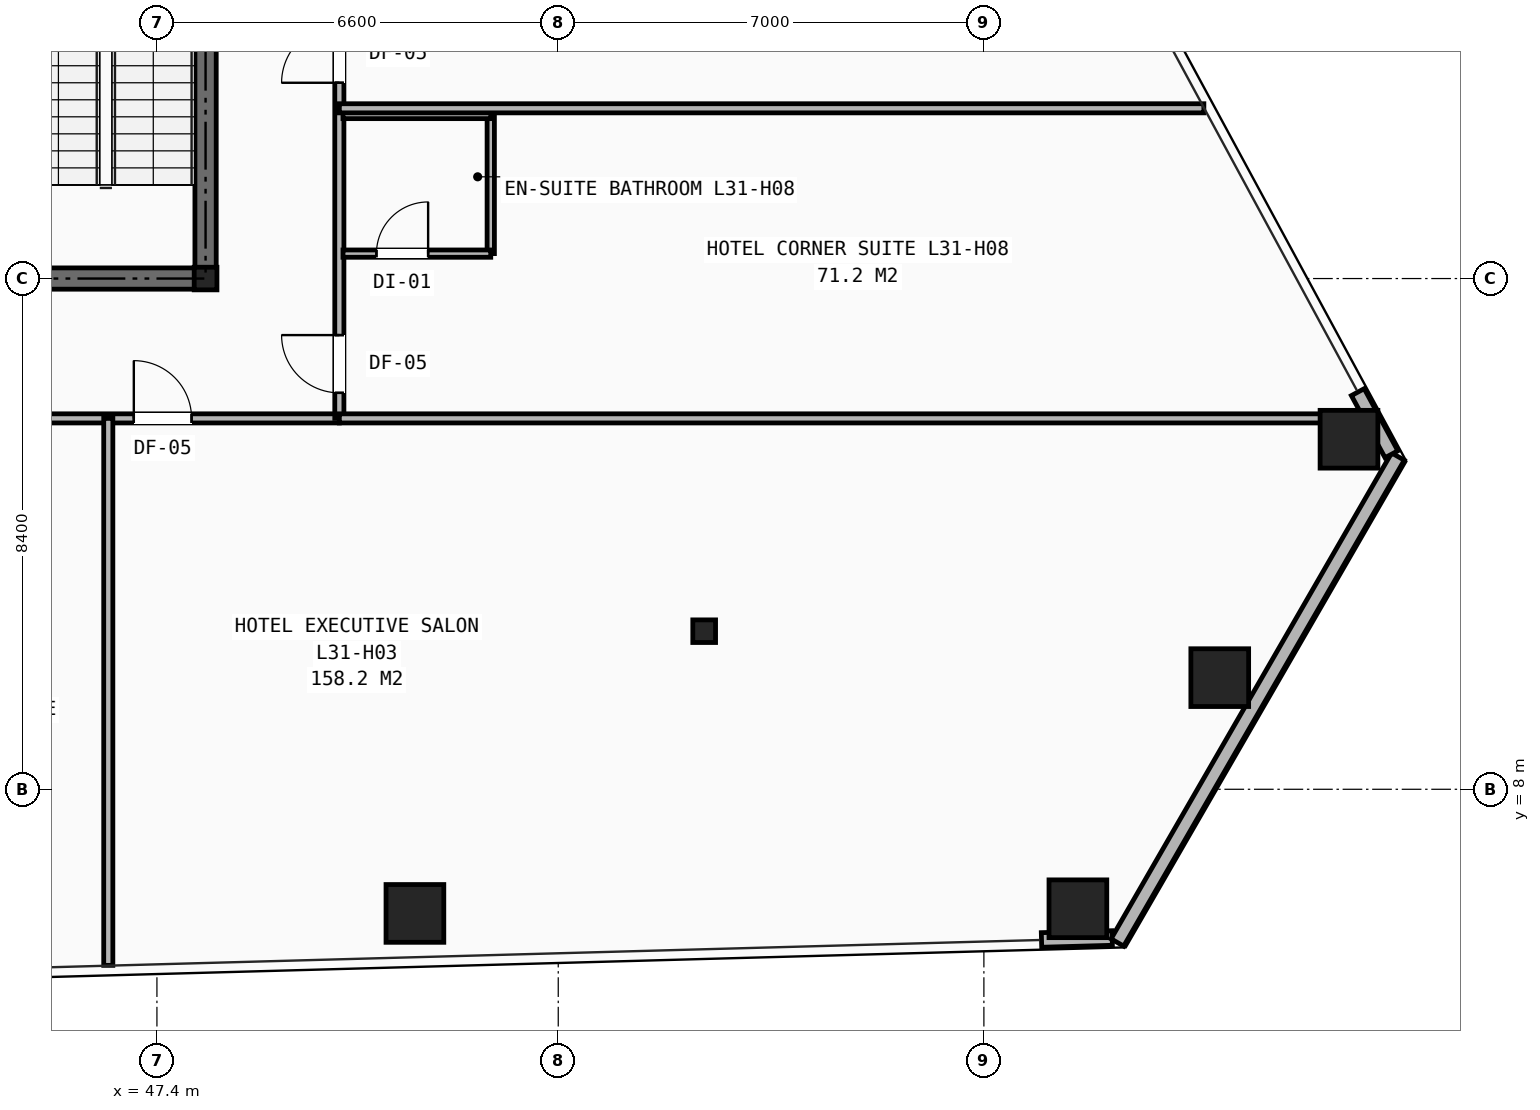
"""IFC4 building model, lengths in metres.
Left out: names, types, materials, properties, quantities, classifications, styles, units other than length and angle.
Written with IfcOpenShell. Run it as: python <this file> out.ifc"""

import sys

from ifc_helpers import new_model, si_unit, direction, frame, frame_2d, origin, origin_2d, place, context, subcontext, project, spatial, rectangle, hollow_rectangle, i_section, extrude, element, fill, save


model = new_model("IFC4")
c1 = context("Model", 3, precision=1e-05, world=origin(), true_north=direction((0.0, 1.0)))
c2 = subcontext(c1, "Body", "Model", "MODEL_VIEW")
j1 = project(units=[si_unit("LENGTHUNIT", "METRE"), si_unit("PLANEANGLEUNIT", "RADIAN")], contexts=[c1])
p1 = place(None, origin())
s1 = spatial("IfcSite", under=j1, at=p1, CompositionType="ELEMENT")
p2 = place(p1, origin())
s2 = spatial("IfcBuilding", under=s1, at=p2, CompositionType="ELEMENT")
p3 = place(p2, frame((0.0, 0.0, 108.6)))
s3 = spatial("IfcBuildingStorey", under=s2, at=p3, CompositionType="ELEMENT", Elevation=108.6)
for number, where, z_axis, x_axis in (
    (1, (48.2, 16.4, 0.0), (0.0, 0.0, 1.0), (1.0, 0.0, 0.0)),
    (2, (56.4, 10.6, 0.0), (0.0, 0.0, 1.0), (1.0, 0.0, 0.0)),
):
    element("IfcColumn", number, at=place(p3, frame(where, z_axis=z_axis, x_axis=x_axis)), inside=s3, PredefinedType="COLUMN", context=c2, shape_type="SweptSolid", body=[
        extrude(i_section(OverallWidth=0.374, OverallDepth=0.372, WebThickness=0.016, FlangeThickness=0.026, at=origin_2d()), origin(), (0.0, 0.0, 1.0), 3.2),
    ])
for number, where, z_axis, x_axis in (
    (3, (51.643, 5.958, 0.0), (0.0, 0.0, 1.0), (1.0, 0.0, 0.0)),
    (4, (62.546, 6.035, 0.0), (0.0, 0.0, 1.0), (1.0, 0.0, 0.0)),
    (5, (64.879, 9.836, 0.0), (0.0, 0.0, 1.0), (1.0, 0.0, 0.0)),
    (6, (67.004, 13.757, 0.0), (0.0, 0.0, 1.0), (1.0, 0.0, 0.0)),
):
    element("IfcColumn", number, at=place(p3, frame(where, z_axis=z_axis, x_axis=x_axis)), inside=s3, PredefinedType="COLUMN", context=c2, shape_type="SweptSolid", body=[
        extrude(hollow_rectangle(XDim=0.95, YDim=0.95, WallThickness=0.065, at=origin_2d()), origin(), (0.0, 0.0, 1.0), 3.2),
    ])
p4 = place(p3, frame((61.948, 5.522, 0.0), z_axis=(0.0, 0.0, 1.0), x_axis=(0.99961555346, 0.027726256158, 0.0)))
e7 = element("IfcWall", 7, at=p4, inside=s3, PredefinedType="SHEAR", context=c2, shape_type="SweptSolid", body=[
    extrude(rectangle(XDim=1.162, YDim=0.24, at=frame_2d((0.581, 0.0))), origin(), (0.0, 0.0, 1.0), 2.223),
])
p5 = place(p3, frame((67.81, 13.472, 0.0), z_axis=(0.0, 0.0, 1.0), x_axis=(-0.500017094579, -0.866015534, 0.0)))
e8 = element("IfcWall", 8, at=p5, inside=s3, PredefinedType="SHEAR", context=c2, shape_type="SweptSolid", body=[
    extrude(rectangle(XDim=9.229, YDim=0.24, at=frame_2d((4.614, 0.0))), origin(), (0.0, 0.0, 1.0), 2.223),
])
p6 = place(p3, frame((67.703, 13.51, 0.0), z_axis=(0.0, 0.0, 1.0), x_axis=(-0.475877177097, 0.879511746549, 0.0)))
e9 = element("IfcWall", 9, at=p6, inside=s3, PredefinedType="SHEAR", context=c2, shape_type="SweptSolid", body=[
    extrude(rectangle(XDim=1.163, YDim=0.24, at=frame_2d((0.581, 0.0))), origin(), (0.0, 0.0, 1.0), 2.223),
])
p7 = place(p3, frame((31.8, 16.4, 0.0), z_axis=(0.0, 0.0, 1.0), x_axis=(1.0, 0.0, 0.0)))
e10 = element("IfcWall", 10, at=p7, inside=s3, PredefinedType="SHEAR", context=c2, shape_type="SweptSolid", body=[
    extrude(rectangle(XDim=16.4, YDim=0.35, at=frame_2d((8.2, 0.0))), origin(), (0.0, 0.0, 1.0), 2.94),
])
p8 = place(p7, frame((7.75, 0.0, 0.0)))
e11 = element("IfcOpeningElement", 11, at=p8, cuts=e10, PredefinedType="OPENING", context=c2, shape_type="SweptSolid", body=[
    extrude(rectangle(XDim=0.9, YDim=2.1, at=frame_2d((0.45, 1.05))), frame((0.0, 0.185, 0.0), z_axis=(0.0, -1.0, 0.0), x_axis=(1.0, 0.0, 0.0)), (0.0, 0.0, 1.0), 0.37),
])
p9 = place(p7, frame((4.2, 0.0, 0.0)))
e12 = element("IfcOpeningElement", 12, at=p9, cuts=e10, PredefinedType="OPENING", context=c2, shape_type="SweptSolid", body=[
    extrude(rectangle(XDim=0.95, YDim=2.1, at=frame_2d((0.475, 1.05))), frame((0.0, 0.185, 0.0), z_axis=(0.0, -1.0, 0.0), x_axis=(1.0, 0.0, 0.0)), (0.0, 0.0, 1.0), 0.37),
])
p10 = place(p7, frame((10.6, 0.0, 0.0)))
e13 = element("IfcOpeningElement", 13, at=p10, cuts=e10, PredefinedType="OPENING", context=c2, shape_type="SweptSolid", body=[
    extrude(rectangle(XDim=0.95, YDim=2.1, at=frame_2d((0.475, 1.05))), frame((0.0, 0.185, 0.0), z_axis=(0.0, -1.0, 0.0), x_axis=(1.0, 0.0, 0.0)), (0.0, 0.0, 1.0), 0.37),
])
p11 = place(p3, frame((48.2, 16.4, 0.0), z_axis=(0.0, 0.0, 1.0), x_axis=(0.0, 1.0, 0.0)))
e14 = element("IfcWall", 14, at=p11, inside=s3, PredefinedType="SHEAR", context=c2, shape_type="SweptSolid", body=[
    extrude(rectangle(XDim=14.8, YDim=0.35, at=frame_2d((7.4, 0.0))), origin(), (0.0, 0.0, 1.0), 2.94),
])
p12 = place(p11, frame((11.0, 0.0, 0.0)))
e15 = element("IfcOpeningElement", 15, at=p12, cuts=e14, PredefinedType="OPENING", context=c2, shape_type="SweptSolid", body=[
    extrude(rectangle(XDim=1.1, YDim=2.15, at=frame_2d((0.55, 1.075))), frame((0.0, 0.185, 0.0), z_axis=(0.0, -1.0, 0.0), x_axis=(1.0, 0.0, 0.0)), (0.0, 0.0, 1.0), 0.37),
])
p13 = place(p3, frame((29.6, 14.1, 0.0), z_axis=(0.0, 0.0, 1.0), x_axis=(1.0, 0.0, 0.0)))
e16 = element("IfcWall", 16, at=p13, inside=s3, PredefinedType="PARTITIONING", context=c2, shape_type="SweptSolid", body=[
    extrude(rectangle(XDim=20.8, YDim=0.15, at=frame_2d((10.4, 0.0))), origin(), (0.0, 0.0, 1.0), 2.151),
])
p14 = place(p13, frame((0.57, 0.0, 0.0)))
e17 = element("IfcOpeningElement", 17, at=p14, cuts=e16, PredefinedType="OPENING", context=c2, shape_type="SweptSolid", body=[
    extrude(rectangle(XDim=0.95, YDim=2.1, at=frame_2d((0.475, 1.05))), frame((0.0, 0.085, 0.0), z_axis=(0.0, -1.0, 0.0), x_axis=(1.0, 0.0, 0.0)), (0.0, 0.0, 1.0), 0.17),
])
p15 = place(p13, frame((13.02, 0.0, 0.0)))
e18 = element("IfcOpeningElement", 18, at=p15, cuts=e16, PredefinedType="OPENING", context=c2, shape_type="SweptSolid", body=[
    extrude(rectangle(XDim=0.95, YDim=2.1, at=frame_2d((0.475, 1.05))), frame((0.0, 0.085, 0.0), z_axis=(0.0, -1.0, 0.0), x_axis=(1.0, 0.0, 0.0)), (0.0, 0.0, 1.0), 0.17),
])
p16 = place(p13, frame((17.42, 0.0, 0.0)))
e19 = element("IfcOpeningElement", 19, at=p16, cuts=e16, PredefinedType="OPENING", context=c2, shape_type="SweptSolid", body=[
    extrude(rectangle(XDim=0.95, YDim=2.1, at=frame_2d((0.475, 1.05))), frame((0.0, 0.085, 0.0), z_axis=(0.0, -1.0, 0.0), x_axis=(1.0, 0.0, 0.0)), (0.0, 0.0, 1.0), 0.17),
])
p17 = place(p3, frame((50.4, 14.1, 0.0), z_axis=(0.0, 0.0, 1.0), x_axis=(0.0, 1.0, 0.0)))
e20 = element("IfcWall", 20, at=p17, inside=s3, PredefinedType="PARTITIONING", context=c2, shape_type="SweptSolid", body=[
    extrude(rectangle(XDim=21.9, YDim=0.15, at=frame_2d((10.95, 0.0))), origin(), (0.0, 0.0, 1.0), 2.151),
])
p18 = place(p17, frame((0.42, 0.0, 0.0)))
e21 = element("IfcOpeningElement", 21, at=p18, cuts=e20, PredefinedType="OPENING", context=c2, shape_type="SweptSolid", body=[
    extrude(rectangle(XDim=0.95, YDim=2.1, at=frame_2d((0.475, 1.05))), frame((0.0, 0.085, 0.0), z_axis=(0.0, -1.0, 0.0), x_axis=(1.0, 0.0, 0.0)), (0.0, 0.0, 1.0), 0.17),
])
p19 = place(p17, frame((5.52, 0.0, 0.0)))
e22 = element("IfcOpeningElement", 22, at=p19, cuts=e20, PredefinedType="OPENING", context=c2, shape_type="SweptSolid", body=[
    extrude(rectangle(XDim=0.95, YDim=2.1, at=frame_2d((0.475, 1.05))), frame((0.0, 0.085, 0.0), z_axis=(0.0, -1.0, 0.0), x_axis=(1.0, 0.0, 0.0)), (0.0, 0.0, 1.0), 0.17),
])
p20 = place(p17, frame((10.92, 0.0, 0.0)))
e23 = element("IfcOpeningElement", 23, at=p20, cuts=e20, PredefinedType="OPENING", context=c2, shape_type="SweptSolid", body=[
    extrude(rectangle(XDim=0.95, YDim=2.1, at=frame_2d((0.475, 1.05))), frame((0.0, 0.085, 0.0), z_axis=(0.0, -1.0, 0.0), x_axis=(1.0, 0.0, 0.0)), (0.0, 0.0, 1.0), 0.17),
])
p21 = place(p17, frame((16.72, 0.0, 0.0)))
e24 = element("IfcOpeningElement", 24, at=p21, cuts=e20, PredefinedType="OPENING", context=c2, shape_type="SweptSolid", body=[
    extrude(rectangle(XDim=0.95, YDim=2.1, at=frame_2d((0.475, 1.05))), frame((0.0, 0.085, 0.0), z_axis=(0.0, -1.0, 0.0), x_axis=(1.0, 0.0, 0.0)), (0.0, 0.0, 1.0), 0.17),
])
p22 = place(p3, frame((46.6, 5.104, 0.0), z_axis=(0.0, 0.0, 1.0), x_axis=(0.0, 1.0, 0.0)))
e25 = element("IfcWall", 25, at=p22, inside=s3, PredefinedType="PARTITIONING", context=c2, shape_type="SweptSolid", body=[
    extrude(rectangle(XDim=8.996, YDim=0.15, at=frame_2d((4.498, 0.0))), origin(), (0.0, 0.0, 1.0), 2.228),
])
p23 = place(p3, frame((50.4, 14.1, 0.0), z_axis=(0.0, 0.0, 1.0), x_axis=(1.0, 0.0, 0.0)))
e26 = element("IfcWall", 26, at=p23, inside=s3, PredefinedType="PARTITIONING", context=c2, shape_type="SweptSolid", body=[
    extrude(rectangle(XDim=16.978, YDim=0.15, at=frame_2d((8.489, 0.0))), origin(), (0.0, 0.0, 1.0), 2.151),
])
p24 = place(p3, frame((52.89, 16.81, 0.0), z_axis=(0.0, 0.0, 1.0), x_axis=(0.0, 1.0, 0.0)))
e27 = element("IfcWall", 27, at=p24, inside=s3, PredefinedType="PARTITIONING", context=c2, shape_type="SweptSolid", body=[
    extrude(rectangle(XDim=2.28, YDim=0.12, at=frame_2d((1.14, 0.0))), origin(), (0.0, 0.0, 1.0), 2.94),
])
p25 = place(p3, frame((50.46, 16.81, 0.0), z_axis=(0.0, 0.0, 1.0), x_axis=(1.0, 0.0, 0.0)))
e28 = element("IfcWall", 28, at=p25, inside=s3, PredefinedType="PARTITIONING", context=c2, shape_type="SweptSolid", body=[
    extrude(rectangle(XDim=2.43, YDim=0.12, at=frame_2d((1.215, 0.0))), origin(), (0.0, 0.0, 1.0), 2.94),
])
p26 = place(p25, frame((0.55, 0.0, 0.0)))
e29 = element("IfcOpeningElement", 29, at=p26, cuts=e28, PredefinedType="OPENING", context=c2, shape_type="SweptSolid", body=[
    extrude(rectangle(XDim=0.85, YDim=2.05, at=frame_2d((0.425, 1.025))), frame((0.0, 0.07, 0.0), z_axis=(0.0, -1.0, 0.0), x_axis=(1.0, 0.0, 0.0)), (0.0, 0.0, 1.0), 0.14),
])
p27 = place(p3, frame((50.46, 19.09, 0.0), z_axis=(0.0, 0.0, 1.0), x_axis=(1.0, 0.0, 0.0)))
e30 = element("IfcWall", 30, at=p27, inside=s3, PredefinedType="PARTITIONING", context=c2, shape_type="SweptSolid", body=[
    extrude(rectangle(XDim=2.43, YDim=0.12, at=frame_2d((1.215, 0.0))), origin(), (0.0, 0.0, 1.0), 2.94),
])
p28 = place(p3, frame((50.4, 19.2, 0.0), z_axis=(0.0, 0.0, 1.0), x_axis=(1.0, 0.0, 0.0)))
e31 = element("IfcWall", 31, at=p28, inside=s3, PredefinedType="PARTITIONING", context=c2, shape_type="SweptSolid", body=[
    extrude(rectangle(XDim=14.218, YDim=0.15, at=frame_2d((7.109, 0.0))), origin(), (0.0, 0.0, 1.0), 2.228),
])
p29 = place(p16, origin())
e32 = element("IfcDoor", 32, at=p29, inside=s3, OperationType="SINGLE_SWING_LEFT", PredefinedType="DOOR", context=c2, shape_type="SweptSolid", body=[
    extrude(rectangle(XDim=0.95, YDim=2.1, at=frame_2d((0.475, 1.05))), frame((0.0, 0.025, 0.0), z_axis=(0.0, -1.0, 0.0), x_axis=(1.0, 0.0, 0.0)), (0.0, 0.0, 1.0), 0.05),
])
fill(e19, e32)
p30 = place(p18, origin())
e33 = element("IfcDoor", 33, at=p30, inside=s3, OperationType="SINGLE_SWING_RIGHT", PredefinedType="DOOR", context=c2, shape_type="SweptSolid", body=[
    extrude(rectangle(XDim=0.95, YDim=2.1, at=frame_2d((0.475, 1.05))), frame((0.0, 0.025, 0.0), z_axis=(0.0, -1.0, 0.0), x_axis=(1.0, 0.0, 0.0)), (0.0, 0.0, 1.0), 0.05),
])
fill(e21, e33)
p31 = place(p26, origin())
e34 = element("IfcDoor", 34, at=p31, inside=s3, OperationType="SINGLE_SWING_RIGHT", PredefinedType="DOOR", context=c2, shape_type="SweptSolid", body=[
    extrude(rectangle(XDim=0.85, YDim=2.05, at=frame_2d((0.425, 1.025))), frame((0.0, 0.025, 0.0), z_axis=(0.0, -1.0, 0.0), x_axis=(1.0, 0.0, 0.0)), (0.0, 0.0, 1.0), 0.05),
])
fill(e29, e34)
p32 = place(p19, origin())
e35 = element("IfcDoor", 35, at=p32, inside=s3, OperationType="SINGLE_SWING_LEFT", PredefinedType="DOOR", context=c2, shape_type="SweptSolid", body=[
    extrude(rectangle(XDim=0.95, YDim=2.1, at=frame_2d((0.475, 1.05))), frame((0.0, 0.025, 0.0), z_axis=(0.0, -1.0, 0.0), x_axis=(1.0, 0.0, 0.0)), (0.0, 0.0, 1.0), 0.05),
])
fill(e22, e35)
save(model, sys.argv[1])
